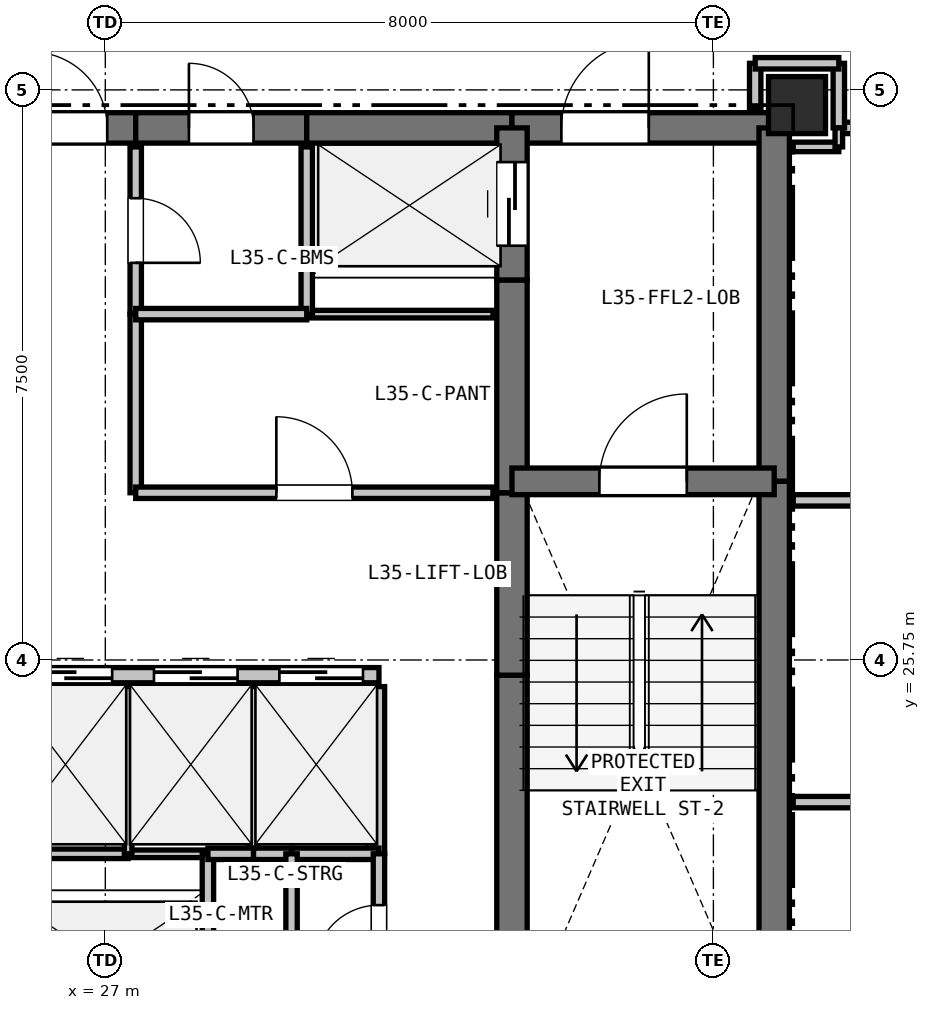
"""IFC4 building model, lengths in metres.
Left out: names, types, materials, properties, quantities, classifications, styles, units other than length and angle.
Written with IfcOpenShell. Run it as: python <this file> out.ifc"""

import sys

from ifc_helpers import new_model, si_unit, direction, frame, frame_2d, origin, origin_2d, place, context, subcontext, project, spatial, rectangle, extrude, element, fill, save


model = new_model("IFC4")
c1 = context("Model", 3, precision=1e-05, world=origin(), true_north=direction((0.0, 1.0)))
c2 = subcontext(c1, "Body", "Model", "MODEL_VIEW")
j1 = project(units=[si_unit("LENGTHUNIT", "METRE"), si_unit("PLANEANGLEUNIT", "RADIAN")], contexts=[c1])
p1 = place(None, origin())
s1 = spatial("IfcSite", under=j1, at=p1, CompositionType="ELEMENT")
p2 = place(p1, origin())
s2 = spatial("IfcBuilding", under=s1, at=p2, CompositionType="ELEMENT")
p3 = place(p2, frame((0.0, 0.0, 127.8)))
s3 = spatial("IfcBuildingStorey", under=s2, at=p3, CompositionType="ELEMENT", Elevation=127.8)
p4 = place(p3, frame((36.1, 33.05, 0.0), z_axis=(0.0, 0.0, 1.0), x_axis=(1.0, 0.0, 0.0)))
e1 = element("IfcColumn", 1, at=p4, inside=s3, PredefinedType="COLUMN", context=c2, shape_type="SweptSolid", body=[
    extrude(rectangle(XDim=0.75, YDim=0.75, at=origin_2d()), origin(), (0.0, 0.0, 1.0), 3.3),
])
p5 = place(p3, frame((25.65, 32.75, 0.0), z_axis=(0.0, 0.0, 1.0), x_axis=(1.0, 0.0, 0.0)))
e2 = element("IfcWall", 2, at=p5, inside=s3, PredefinedType="SHEAR", context=c2, shape_type="SweptSolid", body=[
    extrude(rectangle(XDim=1.75, YDim=0.4, at=frame_2d((0.875, 0.0))), origin(), (0.0, 0.0, 1.0), 3.06),
])
p6 = place(p5, frame((0.375, 0.0, 0.0)))
e3 = element("IfcOpeningElement", 3, at=p6, cuts=e2, PredefinedType="OPENING", context=c2, shape_type="SweptSolid", body=[
    extrude(rectangle(XDim=1.0, YDim=2.15, at=frame_2d((0.5, 1.075))), frame((0.0, 0.21, 0.0), z_axis=(0.0, -1.0, 0.0), x_axis=(1.0, 0.0, 0.0)), (0.0, 0.0, 1.0), 0.42),
])
p7 = place(p3, frame((27.4, 32.75, 0.0), z_axis=(0.0, 0.0, 1.0), x_axis=(1.0, 0.0, 0.0)))
e4 = element("IfcWall", 4, at=p7, inside=s3, PredefinedType="SHEAR", context=c2, shape_type="SweptSolid", body=[
    extrude(rectangle(XDim=2.25, YDim=0.4, at=frame_2d((1.125, 0.0))), origin(), (0.0, 0.0, 1.0), 3.06),
])
p8 = place(p7, frame((0.7, 0.0, 0.0)))
e5 = element("IfcOpeningElement", 5, at=p8, cuts=e4, PredefinedType="OPENING", context=c2, shape_type="SweptSolid", body=[
    extrude(rectangle(XDim=0.85, YDim=2.1, at=frame_2d((0.425, 1.05))), frame((0.0, 0.21, 0.0), z_axis=(0.0, -1.0, 0.0), x_axis=(1.0, 0.0, 0.0)), (0.0, 0.0, 1.0), 0.42),
])
p9 = place(p3, frame((29.65, 32.75, 0.0), z_axis=(0.0, 0.0, 1.0), x_axis=(1.0, 0.0, 0.0)))
e6 = element("IfcWall", 6, at=p9, inside=s3, PredefinedType="SHEAR", context=c2, shape_type="SweptSolid", body=[
    extrude(rectangle(XDim=2.7, YDim=0.4, at=frame_2d((1.35, 0.0))), origin(), (0.0, 0.0, 1.0), 3.06),
])
p10 = place(p3, frame((32.35, 32.75, 0.0), z_axis=(0.0, 0.0, 1.0), x_axis=(1.0, 0.0, 0.0)))
e7 = element("IfcWall", 7, at=p10, inside=s3, PredefinedType="SHEAR", context=c2, shape_type="SweptSolid", body=[
    extrude(rectangle(XDim=3.45, YDim=0.4, at=frame_2d((1.725, 0.0))), origin(), (0.0, 0.0, 1.0), 3.06),
])
p11 = place(p10, frame((0.65, 0.0, 0.0)))
e8 = element("IfcOpeningElement", 8, at=p11, cuts=e7, PredefinedType="OPENING", context=c2, shape_type="SweptSolid", body=[
    extrude(rectangle(XDim=1.15, YDim=2.15, at=frame_2d((0.575, 1.075))), frame((0.0, 0.21, 0.0), z_axis=(0.0, -1.0, 0.0), x_axis=(1.0, 0.0, 0.0)), (0.0, 0.0, 1.0), 0.42),
])
p12 = place(p3, frame((35.8, 32.75, 0.0), z_axis=(0.0, 0.0, 1.0), x_axis=(0.0, -1.0, 0.0)))
e9 = element("IfcWall", 9, at=p12, inside=s3, PredefinedType="SHEAR", context=c2, shape_type="SweptSolid", body=[
    extrude(rectangle(XDim=4.65, YDim=0.4, at=frame_2d((2.325, 0.0))), origin(), (0.0, 0.0, 1.0), 3.06),
])
p13 = place(p3, frame((35.8, 28.1, 0.0), z_axis=(0.0, 0.0, 1.0), x_axis=(0.0, -1.0, 0.0)))
e10 = element("IfcWall", 10, at=p13, inside=s3, PredefinedType="SHEAR", context=c2, shape_type="SweptSolid", body=[
    extrude(rectangle(XDim=7.35, YDim=0.4, at=frame_2d((3.675, 0.0))), origin(), (0.0, 0.0, 1.0), 3.06),
])
p14 = place(p3, frame((32.35, 20.75, 0.0), z_axis=(0.0, 0.0, 1.0), x_axis=(0.0, 1.0, 0.0)))
e11 = element("IfcWall", 11, at=p14, inside=s3, PredefinedType="SHEAR", context=c2, shape_type="SweptSolid", body=[
    extrude(rectangle(XDim=4.8, YDim=0.4, at=frame_2d((2.4, 0.0))), origin(), (0.0, 0.0, 1.0), 3.06),
])
p15 = place(p3, frame((32.35, 25.55, 0.0), z_axis=(0.0, 0.0, 1.0), x_axis=(0.0, 1.0, 0.0)))
e12 = element("IfcWall", 12, at=p15, inside=s3, PredefinedType="SHEAR", context=c2, shape_type="SweptSolid", body=[
    extrude(rectangle(XDim=2.4, YDim=0.4, at=frame_2d((1.2, 0.0))), origin(), (0.0, 0.0, 1.0), 3.06),
])
p16 = place(p3, frame((32.35, 27.95, 0.0), z_axis=(0.0, 0.0, 1.0), x_axis=(0.0, 1.0, 0.0)))
e13 = element("IfcWall", 13, at=p16, inside=s3, PredefinedType="SHEAR", context=c2, shape_type="SweptSolid", body=[
    extrude(rectangle(XDim=2.8, YDim=0.4, at=frame_2d((1.4, 0.0))), origin(), (0.0, 0.0, 1.0), 3.06),
])
p17 = place(p3, frame((32.35, 30.75, 0.0), z_axis=(0.0, 0.0, 1.0), x_axis=(0.0, 1.0, 0.0)))
e14 = element("IfcWall", 14, at=p17, inside=s3, PredefinedType="SHEAR", context=c2, shape_type="SweptSolid", body=[
    extrude(rectangle(XDim=2.0, YDim=0.4, at=frame_2d((1.0, 0.0))), origin(), (0.0, 0.0, 1.0), 3.06),
])
p18 = place(p17, frame((0.45, 0.0, 0.0)))
e15 = element("IfcOpeningElement", 15, at=p18, cuts=e14, PredefinedType="OPENING", context=c2, shape_type="SweptSolid", body=[
    extrude(rectangle(XDim=1.1, YDim=2.15, at=frame_2d((0.55, 1.075))), frame((0.0, 0.21, 0.0), z_axis=(0.0, -1.0, 0.0), x_axis=(1.0, 0.0, 0.0)), (0.0, 0.0, 1.0), 0.42),
])
p19 = place(p3, frame((32.35, 28.1, 0.0), z_axis=(0.0, 0.0, 1.0), x_axis=(1.0, 0.0, 0.0)))
e16 = element("IfcWall", 16, at=p19, inside=s3, PredefinedType="SHEAR", context=c2, shape_type="SweptSolid", body=[
    extrude(rectangle(XDim=3.45, YDim=0.35, at=frame_2d((1.725, 0.0))), origin(), (0.0, 0.0, 1.0), 3.06),
])
p20 = place(p19, frame((1.15, 0.0, 0.0)))
e17 = element("IfcOpeningElement", 17, at=p20, cuts=e16, PredefinedType="OPENING", context=c2, shape_type="SweptSolid", body=[
    extrude(rectangle(XDim=1.15, YDim=2.15, at=frame_2d((0.575, 1.075))), frame((0.0, 0.185, 0.0), z_axis=(0.0, -1.0, 0.0), x_axis=(1.0, 0.0, 0.0)), (0.0, 0.0, 1.0), 0.37),
])
p21 = place(p3, frame((25.65, 25.55, 0.0), z_axis=(0.0, 0.0, 1.0), x_axis=(1.0, 0.0, 0.0)))
e18 = element("IfcWall", 18, at=p21, inside=s3, PredefinedType="PARTITIONING", context=c2, shape_type="SweptSolid", body=[
    extrude(rectangle(XDim=4.95, YDim=0.2, at=frame_2d((2.475, 0.0))), origin(), (0.0, 0.0, 1.0), 3.06),
])
p22 = place(p21, frame((0.34, 0.0, 0.0)))
e19 = element("IfcOpeningElement", 19, at=p22, cuts=e18, PredefinedType="OPENING", context=c2, shape_type="SweptSolid", body=[
    extrude(rectangle(XDim=1.1, YDim=2.15, at=frame_2d((0.55, 1.075))), frame((0.0, 0.11, 0.0), z_axis=(0.0, -1.0, 0.0), x_axis=(1.0, 0.0, 0.0)), (0.0, 0.0, 1.0), 0.22),
])
p23 = place(p21, frame((1.99, 0.0, 0.0)))
e20 = element("IfcOpeningElement", 20, at=p23, cuts=e18, PredefinedType="OPENING", context=c2, shape_type="SweptSolid", body=[
    extrude(rectangle(XDim=1.1, YDim=2.15, at=frame_2d((0.55, 1.075))), frame((0.0, 0.11, 0.0), z_axis=(0.0, -1.0, 0.0), x_axis=(1.0, 0.0, 0.0)), (0.0, 0.0, 1.0), 0.22),
])
p24 = place(p21, frame((3.64, 0.0, 0.0)))
e21 = element("IfcOpeningElement", 21, at=p24, cuts=e18, PredefinedType="OPENING", context=c2, shape_type="SweptSolid", body=[
    extrude(rectangle(XDim=1.1, YDim=2.15, at=frame_2d((0.55, 1.075))), frame((0.0, 0.11, 0.0), z_axis=(0.0, -1.0, 0.0), x_axis=(1.0, 0.0, 0.0)), (0.0, 0.0, 1.0), 0.22),
])
p25 = place(p3, frame((25.9, 23.2, 0.0), z_axis=(0.0, 0.0, 1.0), x_axis=(1.0, 0.0, 0.0)))
e22 = element("IfcWall", 22, at=p25, inside=s3, PredefinedType="PARTITIONING", context=c2, shape_type="SweptSolid", body=[
    extrude(rectangle(XDim=1.4, YDim=0.125, at=frame_2d((0.7, 0.0))), origin(), (0.0, 0.0, 1.0), 3.06),
])
p26 = place(p3, frame((27.3, 23.2, 0.0), z_axis=(0.0, 0.0, 1.0), x_axis=(1.0, 0.0, 0.0)))
e23 = element("IfcWall", 23, at=p26, inside=s3, PredefinedType="PARTITIONING", context=c2, shape_type="SweptSolid", body=[
    extrude(rectangle(XDim=1.05, YDim=0.1, at=frame_2d((0.525, 0.0))), origin(), (0.0, 0.0, 1.0), 3.06),
])
p27 = place(p3, frame((28.35, 23.2, 0.0), z_axis=(0.0, 0.0, 1.0), x_axis=(0.0, -1.0, 0.0)))
e24 = element("IfcWall", 24, at=p27, inside=s3, PredefinedType="PARTITIONING", context=c2, shape_type="SweptSolid", body=[
    extrude(rectangle(XDim=2.2, YDim=0.15, at=frame_2d((1.1, 0.0))), origin(), (0.0, 0.0, 1.0), 3.06),
])
p28 = place(p3, frame((32.1, 30.3, 0.0), z_axis=(0.0, 0.0, 1.0), x_axis=(-1.0, 0.0, 0.0)))
e25 = element("IfcWall", 25, at=p28, inside=s3, PredefinedType="PARTITIONING", context=c2, shape_type="SweptSolid", body=[
    extrude(rectangle(XDim=2.45, YDim=0.1, at=frame_2d((1.225, 0.0))), origin(), (0.0, 0.0, 1.0), 3.06),
])
p29 = place(p3, frame((29.65, 30.3, 0.0), z_axis=(0.0, 0.0, 1.0), x_axis=(0.0, 1.0, 0.0)))
e26 = element("IfcWall", 26, at=p29, inside=s3, PredefinedType="PARTITIONING", context=c2, shape_type="SweptSolid", body=[
    extrude(rectangle(XDim=2.2, YDim=0.15, at=frame_2d((1.1, 0.0))), origin(), (0.0, 0.0, 1.0), 3.06),
])
p30 = place(p3, frame((27.3, 25.4, 0.0), z_axis=(0.0, 0.0, 1.0), x_axis=(0.0, -1.0, 0.0)))
e27 = element("IfcWall", 27, at=p30, inside=s3, PredefinedType="PARTITIONING", context=c2, shape_type="SweptSolid", body=[
    extrude(rectangle(XDim=2.2, YDim=0.1, at=frame_2d((1.1, 0.0))), origin(), (0.0, 0.0, 1.0), 3.06),
])
p31 = place(p3, frame((28.95, 25.4, 0.0), z_axis=(0.0, 0.0, 1.0), x_axis=(0.0, -1.0, 0.0)))
e28 = element("IfcWall", 28, at=p31, inside=s3, PredefinedType="PARTITIONING", context=c2, shape_type="SweptSolid", body=[
    extrude(rectangle(XDim=2.2, YDim=0.125, at=frame_2d((1.1, 0.0))), origin(), (0.0, 0.0, 1.0), 3.06),
])
p32 = place(p3, frame((28.95, 23.2, 0.0), z_axis=(0.0, 0.0, 1.0), x_axis=(-1.0, 0.0, 0.0)))
e29 = element("IfcWall", 29, at=p32, inside=s3, PredefinedType="PARTITIONING", context=c2, shape_type="SweptSolid", body=[
    extrude(rectangle(XDim=0.6, YDim=0.15, at=frame_2d((0.3, 0.0))), origin(), (0.0, 0.0, 1.0), 3.06),
])
p33 = place(p3, frame((30.6, 25.4, 0.0), z_axis=(0.0, 0.0, 1.0), x_axis=(0.0, -1.0, 0.0)))
e30 = element("IfcWall", 30, at=p33, inside=s3, PredefinedType="PARTITIONING", context=c2, shape_type="SweptSolid", body=[
    extrude(rectangle(XDim=2.2, YDim=0.15, at=frame_2d((1.1, 0.0))), origin(), (0.0, 0.0, 1.0), 3.06),
])
p34 = place(p3, frame((30.6, 23.2, 0.0), z_axis=(0.0, 0.0, 1.0), x_axis=(-1.0, 0.0, 0.0)))
e31 = element("IfcWall", 31, at=p34, inside=s3, PredefinedType="PARTITIONING", context=c2, shape_type="SweptSolid", body=[
    extrude(rectangle(XDim=1.15, YDim=0.15, at=frame_2d((0.575, 0.0))), origin(), (0.0, 0.0, 1.0), 3.06),
])
p35 = place(p3, frame((29.45, 23.2, 0.0), z_axis=(0.0, 0.0, 1.0), x_axis=(-1.0, 0.0, 0.0)))
e32 = element("IfcWall", 32, at=p35, inside=s3, PredefinedType="PARTITIONING", context=c2, shape_type="SweptSolid", body=[
    extrude(rectangle(XDim=0.5, YDim=0.15, at=frame_2d((0.25, 0.0))), origin(), (0.0, 0.0, 1.0), 3.06),
])
p36 = place(p3, frame((30.6, 21.0, 0.0), z_axis=(0.0, 0.0, 1.0), x_axis=(0.0, 1.0, 0.0)))
e33 = element("IfcWall", 33, at=p36, inside=s3, PredefinedType="PARTITIONING", context=c2, shape_type="SweptSolid", body=[
    extrude(rectangle(XDim=2.2, YDim=0.15, at=frame_2d((1.1, 0.0))), origin(), (0.0, 0.0, 1.0), 3.06),
])
p37 = place(p36, frame((0.675, 0.0, 0.0)))
e34 = element("IfcOpeningElement", 34, at=p37, cuts=e33, PredefinedType="OPENING", context=c2, shape_type="SweptSolid", body=[
    extrude(rectangle(XDim=0.85, YDim=2.1, at=frame_2d((0.425, 1.05))), frame((0.0, 0.085, 0.0), z_axis=(0.0, -1.0, 0.0), x_axis=(1.0, 0.0, 0.0)), (0.0, 0.0, 1.0), 0.17),
])
p38 = place(p3, frame((27.4, 32.5, 0.0), z_axis=(0.0, 0.0, 1.0), x_axis=(0.0, -1.0, 0.0)))
e35 = element("IfcWall", 35, at=p38, inside=s3, PredefinedType="PARTITIONING", context=c2, shape_type="SweptSolid", body=[
    extrude(rectangle(XDim=2.2, YDim=0.15, at=frame_2d((1.1, 0.0))), origin(), (0.0, 0.0, 1.0), 3.06),
])
p39 = place(p38, frame((0.675, 0.0, 0.0)))
e36 = element("IfcOpeningElement", 36, at=p39, cuts=e35, PredefinedType="OPENING", context=c2, shape_type="SweptSolid", body=[
    extrude(rectangle(XDim=0.85, YDim=2.1, at=frame_2d((0.425, 1.05))), frame((0.0, 0.085, 0.0), z_axis=(0.0, -1.0, 0.0), x_axis=(1.0, 0.0, 0.0)), (0.0, 0.0, 1.0), 0.17),
])
p40 = place(p3, frame((27.4, 30.3, 0.0), z_axis=(0.0, 0.0, 1.0), x_axis=(0.0, -1.0, 0.0)))
e37 = element("IfcWall", 37, at=p40, inside=s3, PredefinedType="PARTITIONING", context=c2, shape_type="SweptSolid", body=[
    extrude(rectangle(XDim=2.35, YDim=0.15, at=frame_2d((1.175, 0.0))), origin(), (0.0, 0.0, 1.0), 3.06),
])
p41 = place(p3, frame((27.4, 27.95, 0.0), z_axis=(0.0, 0.0, 1.0), x_axis=(1.0, 0.0, 0.0)))
e38 = element("IfcWall", 38, at=p41, inside=s3, PredefinedType="PARTITIONING", context=c2, shape_type="SweptSolid", body=[
    extrude(rectangle(XDim=4.7, YDim=0.15, at=frame_2d((2.35, 0.0))), origin(), (0.0, 0.0, 1.0), 3.06),
])
p42 = place(p41, frame((1.85, 0.0, 0.0)))
e39 = element("IfcOpeningElement", 39, at=p42, cuts=e38, PredefinedType="OPENING", context=c2, shape_type="SweptSolid", body=[
    extrude(rectangle(XDim=1.0, YDim=2.15, at=frame_2d((0.5, 1.075))), frame((0.0, 0.085, 0.0), z_axis=(0.0, -1.0, 0.0), x_axis=(1.0, 0.0, 0.0)), (0.0, 0.0, 1.0), 0.17),
])
p43 = place(p3, frame((35.55, 33.6, 0.0), z_axis=(0.0, 0.0, 1.0), x_axis=(0.0, -1.0, 0.0)))
e40 = element("IfcWall", 40, at=p43, inside=s3, PredefinedType="PARTITIONING", context=c2, shape_type="SweptSolid", body=[
    extrude(rectangle(XDim=0.6, YDim=0.15, at=frame_2d((0.3, 0.0))), origin(), (0.0, 0.0, 1.0), 2.508),
])
p44 = place(p3, frame((39.2, 32.75, 0.0), z_axis=(0.0, 0.0, 1.0), x_axis=(-1.0, 0.0, 0.0)))
e41 = element("IfcWall", 41, at=p44, inside=s3, PredefinedType="PARTITIONING", context=c2, shape_type="SweptSolid", body=[
    extrude(rectangle(XDim=2.55, YDim=0.15, at=frame_2d((1.275, 0.0))), origin(), (0.0, 0.0, 1.0), 3.06),
])
p45 = place(p44, frame((0.775, 0.0, 0.0)))
e42 = element("IfcOpeningElement", 42, at=p45, cuts=e41, PredefinedType="OPENING", context=c2, shape_type="SweptSolid", body=[
    extrude(rectangle(XDim=1.0, YDim=2.15, at=frame_2d((0.5, 1.075))), frame((0.0, 0.085, 0.0), z_axis=(0.0, -1.0, 0.0), x_axis=(1.0, 0.0, 0.0)), (0.0, 0.0, 1.0), 0.17),
])
p46 = place(p3, frame((36.65, 32.75, 0.0), z_axis=(0.0, 0.0, 1.0), x_axis=(0.0, 1.0, 0.0)))
e43 = element("IfcWall", 43, at=p46, inside=s3, PredefinedType="PARTITIONING", context=c2, shape_type="SweptSolid", body=[
    extrude(rectangle(XDim=0.85, YDim=0.15, at=frame_2d((0.425, 0.0))), origin(), (0.0, 0.0, 1.0), 2.433),
])
p47 = place(p3, frame((36.65, 33.6, 0.0), z_axis=(0.0, 0.0, 1.0), x_axis=(-1.0, 0.0, 0.0)))
e44 = element("IfcWall", 44, at=p47, inside=s3, PredefinedType="PARTITIONING", context=c2, shape_type="SweptSolid", body=[
    extrude(rectangle(XDim=1.1, YDim=0.15, at=frame_2d((0.55, 0.0))), origin(), (0.0, 0.0, 1.0), 2.433),
])
p48 = place(p3, frame((27.4, 30.3, 0.0), z_axis=(0.0, 0.0, 1.0), x_axis=(1.0, 0.0, 0.0)))
e45 = element("IfcWall", 45, at=p48, inside=s3, PredefinedType="PARTITIONING", context=c2, shape_type="SweptSolid", body=[
    extrude(rectangle(XDim=2.25, YDim=0.15, at=frame_2d((1.125, 0.0))), origin(), (0.0, 0.0, 1.0), 3.06),
])
p49 = place(p3, frame((29.45, 23.2, 0.0), z_axis=(0.0, 0.0, 1.0), x_axis=(0.0, -1.0, 0.0)))
e46 = element("IfcWall", 46, at=p49, inside=s3, PredefinedType="PARTITIONING", context=c2, shape_type="SweptSolid", body=[
    extrude(rectangle(XDim=2.2, YDim=0.15, at=frame_2d((1.1, 0.0))), origin(), (0.0, 0.0, 1.0), 3.06),
])
p50 = place(p3, frame((36.05, 32.5, 0.0), z_axis=(0.0, 0.0, 1.0), x_axis=(1.0, 0.0, 0.0)))
e47 = element("IfcWall", 47, at=p50, inside=s3, PredefinedType="PARTITIONING", context=c2, shape_type="SweptSolid", body=[
    extrude(rectangle(XDim=0.6, YDim=0.125, at=frame_2d((0.3, 0.0))), origin(), (0.0, 0.0, 1.0), 2.508),
])
p51 = place(p3, frame((36.65, 32.5, 0.0), z_axis=(0.0, 0.0, 1.0), x_axis=(0.0, 1.0, 0.0)))
e48 = element("IfcWall", 48, at=p51, inside=s3, PredefinedType="PARTITIONING", context=c2, shape_type="SweptSolid", body=[
    extrude(rectangle(XDim=0.25, YDim=0.1, at=frame_2d((0.125, 0.0))), origin(), (0.0, 0.0, 1.0), 3.06),
])
p52 = place(p3, frame((42.181, 27.85, 0.0), z_axis=(0.0, 0.0, 1.0), x_axis=(-1.0, 0.0, 0.0)))
e49 = element("IfcWall", 49, at=p52, inside=s3, PredefinedType="PARTITIONING", context=c2, shape_type="SweptSolid", body=[
    extrude(rectangle(XDim=6.131, YDim=0.15, at=frame_2d((3.065, 0.0))), origin(), (0.0, 0.0, 1.0), 2.365),
])
p53 = place(p52, frame((2.641, 0.0, 0.0)))
e50 = element("IfcOpeningElement", 50, at=p53, cuts=e49, PredefinedType="OPENING", context=c2, shape_type="SweptSolid", body=[
    extrude(rectangle(XDim=0.85, YDim=2.1, at=frame_2d((0.425, 1.05))), frame((0.0, 0.085, 0.0), z_axis=(0.0, -1.0, 0.0), x_axis=(1.0, 0.0, 0.0)), (0.0, 0.0, 1.0), 0.17),
])
p54 = place(p3, frame((36.05, 23.88, 0.0), z_axis=(0.0, 0.0, 1.0), x_axis=(1.0, 0.0, 0.0)))
e51 = element("IfcWall", 51, at=p54, inside=s3, PredefinedType="PARTITIONING", context=c2, shape_type="SweptSolid", body=[
    extrude(rectangle(XDim=6.131, YDim=0.15, at=frame_2d((3.065, 0.0))), origin(), (0.0, 0.0, 1.0), 2.365),
])
p55 = place(p22, origin())
e52 = element("IfcDoor", 52, at=p55, inside=s3, OperationType="SLIDING_TO_LEFT", PredefinedType="DOOR", context=c2, shape_type="SweptSolid", body=[
    extrude(rectangle(XDim=1.1, YDim=2.15, at=frame_2d((0.55, 1.075))), frame((0.0, 0.025, 0.0), z_axis=(0.0, -1.0, 0.0), x_axis=(1.0, 0.0, 0.0)), (0.0, 0.0, 1.0), 0.05),
])
fill(e19, e52)
p56 = place(p23, origin())
e53 = element("IfcDoor", 53, at=p56, inside=s3, OperationType="SLIDING_TO_LEFT", PredefinedType="DOOR", context=c2, shape_type="SweptSolid", body=[
    extrude(rectangle(XDim=1.1, YDim=2.15, at=frame_2d((0.55, 1.075))), frame((0.0, 0.025, 0.0), z_axis=(0.0, -1.0, 0.0), x_axis=(1.0, 0.0, 0.0)), (0.0, 0.0, 1.0), 0.05),
])
fill(e20, e53)
p57 = place(p24, origin())
e54 = element("IfcDoor", 54, at=p57, inside=s3, OperationType="SLIDING_TO_LEFT", PredefinedType="DOOR", context=c2, shape_type="SweptSolid", body=[
    extrude(rectangle(XDim=1.1, YDim=2.15, at=frame_2d((0.55, 1.075))), frame((0.0, 0.025, 0.0), z_axis=(0.0, -1.0, 0.0), x_axis=(1.0, 0.0, 0.0)), (0.0, 0.0, 1.0), 0.05),
])
fill(e21, e54)
p58 = place(p6, origin())
e55 = element("IfcDoor", 55, at=p58, inside=s3, OperationType="SINGLE_SWING_LEFT", PredefinedType="DOOR", context=c2, shape_type="SweptSolid", body=[
    extrude(rectangle(XDim=1.0, YDim=2.15, at=frame_2d((0.5, 1.075))), frame((0.0, 0.025, 0.0), z_axis=(0.0, -1.0, 0.0), x_axis=(1.0, 0.0, 0.0)), (0.0, 0.0, 1.0), 0.05),
])
fill(e3, e55)
p59 = place(p18, origin())
e56 = element("IfcDoor", 56, at=p59, inside=s3, OperationType="SLIDING_TO_LEFT", PredefinedType="DOOR", context=c2, shape_type="SweptSolid", body=[
    extrude(rectangle(XDim=1.1, YDim=2.15, at=frame_2d((0.55, 1.075))), frame((0.0, 0.025, 0.0), z_axis=(0.0, -1.0, 0.0), x_axis=(1.0, 0.0, 0.0)), (0.0, 0.0, 1.0), 0.05),
])
fill(e15, e56)
p60 = place(p20, origin())
e57 = element("IfcDoor", 57, at=p60, inside=s3, OperationType="SINGLE_SWING_RIGHT", PredefinedType="DOOR", context=c2, shape_type="SweptSolid", body=[
    extrude(rectangle(XDim=1.15, YDim=2.15, at=frame_2d((0.575, 1.075))), frame((0.0, 0.025, 0.0), z_axis=(0.0, -1.0, 0.0), x_axis=(1.0, 0.0, 0.0)), (0.0, 0.0, 1.0), 0.05),
])
fill(e17, e57)
p61 = place(p11, origin())
e58 = element("IfcDoor", 58, at=p61, inside=s3, OperationType="SINGLE_SWING_RIGHT", PredefinedType="DOOR", context=c2, shape_type="SweptSolid", body=[
    extrude(rectangle(XDim=1.15, YDim=2.15, at=frame_2d((0.575, 1.075))), frame((0.0, 0.025, 0.0), z_axis=(0.0, -1.0, 0.0), x_axis=(1.0, 0.0, 0.0)), (0.0, 0.0, 1.0), 0.05),
])
fill(e8, e58)
p62 = place(p42, origin())
e59 = element("IfcDoor", 59, at=p62, inside=s3, OperationType="SINGLE_SWING_LEFT", PredefinedType="DOOR", context=c2, shape_type="SweptSolid", body=[
    extrude(rectangle(XDim=1.0, YDim=2.15, at=frame_2d((0.5, 1.075))), frame((0.0, 0.025, 0.0), z_axis=(0.0, -1.0, 0.0), x_axis=(1.0, 0.0, 0.0)), (0.0, 0.0, 1.0), 0.05),
])
fill(e39, e59)
p63 = place(p39, origin())
e60 = element("IfcDoor", 60, at=p63, inside=s3, OperationType="SINGLE_SWING_RIGHT", PredefinedType="DOOR", context=c2, shape_type="SweptSolid", body=[
    extrude(rectangle(XDim=0.85, YDim=2.1, at=frame_2d((0.425, 1.05))), frame((0.0, 0.025, 0.0), z_axis=(0.0, -1.0, 0.0), x_axis=(1.0, 0.0, 0.0)), (0.0, 0.0, 1.0), 0.05),
])
fill(e36, e60)
p64 = place(p37, origin())
e61 = element("IfcDoor", 61, at=p64, inside=s3, OperationType="SINGLE_SWING_LEFT", PredefinedType="DOOR", context=c2, shape_type="SweptSolid", body=[
    extrude(rectangle(XDim=0.85, YDim=2.1, at=frame_2d((0.425, 1.05))), frame((0.0, 0.025, 0.0), z_axis=(0.0, -1.0, 0.0), x_axis=(1.0, 0.0, 0.0)), (0.0, 0.0, 1.0), 0.05),
])
fill(e34, e61)
p65 = place(p8, origin())
e62 = element("IfcDoor", 62, at=p65, inside=s3, OperationType="SINGLE_SWING_LEFT", PredefinedType="DOOR", context=c2, shape_type="SweptSolid", body=[
    extrude(rectangle(XDim=0.85, YDim=2.1, at=frame_2d((0.425, 1.05))), frame((0.0, 0.025, 0.0), z_axis=(0.0, -1.0, 0.0), x_axis=(1.0, 0.0, 0.0)), (0.0, 0.0, 1.0), 0.05),
])
fill(e5, e62)
save(model, sys.argv[1])
